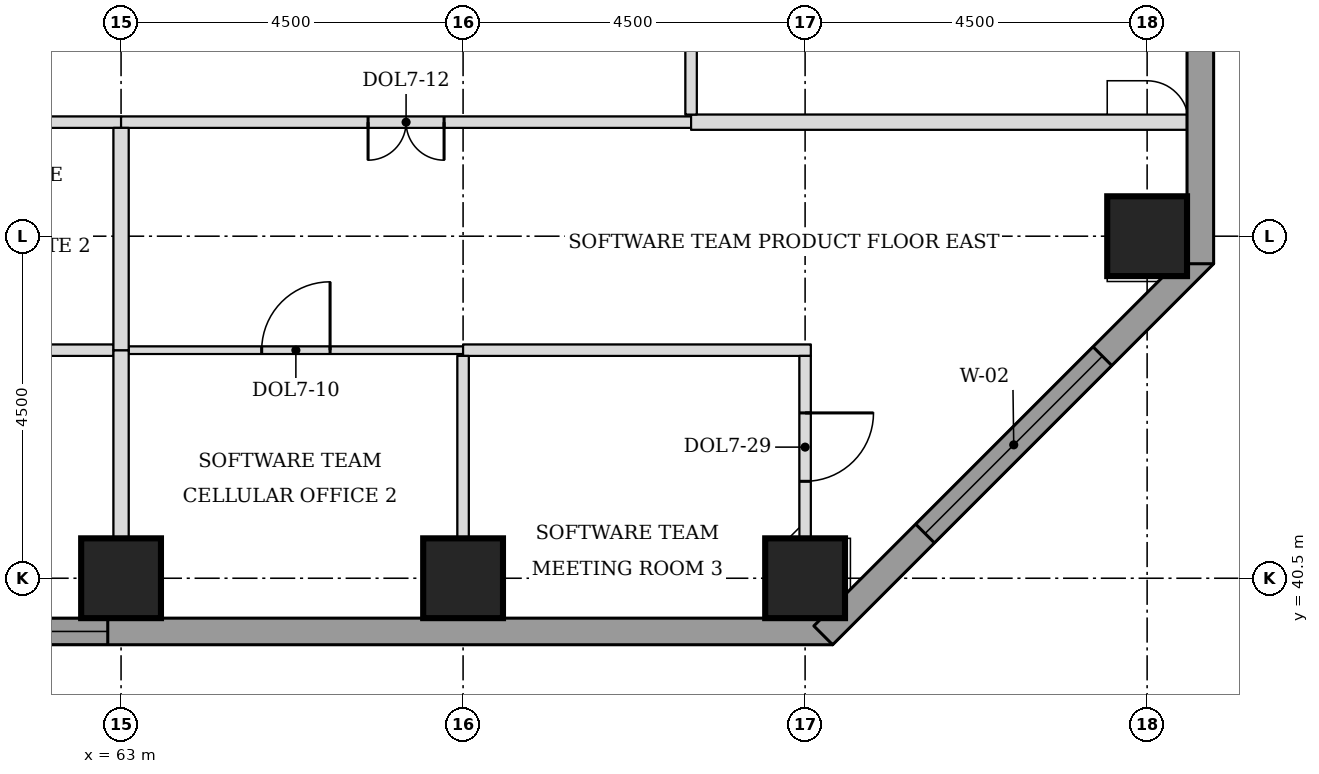
"""IFC4 building model, lengths in metres.
Left out: names, types, materials, properties, quantities, classifications, styles, units other than length and angle.
Written with IfcOpenShell. Run it as: python <this file> out.ifc"""

import sys

from ifc_helpers import new_model, si_unit, direction, frame, frame_2d, origin, origin_2d, place, context, subcontext, project, spatial, rectangle, extrude, element, fill, save


model = new_model("IFC4")
c1 = context("Model", 3, precision=1e-05, world=origin(), true_north=direction((0.0, 1.0)))
c2 = subcontext(c1, "Body", "Model", "MODEL_VIEW")
j1 = project(units=[si_unit("LENGTHUNIT", "METRE"), si_unit("PLANEANGLEUNIT", "RADIAN")], contexts=[c1])
p1 = place(None, origin())
s1 = spatial("IfcSite", under=j1, at=p1, CompositionType="ELEMENT")
p2 = place(p1, origin())
s2 = spatial("IfcBuilding", under=s1, at=p2, CompositionType="ELEMENT")
p3 = place(p2, frame((0.0, 0.0, 134.4)))
s3 = spatial("IfcBuildingStorey", under=s2, at=p3, CompositionType="ELEMENT", Elevation=134.4)
for number, where, z_axis, x_axis in (
    (1, (63.0, 40.5, 0.0), (0.0, 0.0, 1.0), (1.0, 0.0, 0.0)),
    (2, (67.5, 40.5, 0.0), (0.0, 0.0, 1.0), (1.0, 0.0, 0.0)),
    (3, (72.0, 40.5, 0.0), (0.0, 0.0, 1.0), (1.0, 0.0, 0.0)),
    (4, (76.5, 45.0, 0.0), (0.0, 0.0, 1.0), (1.0, 0.0, 0.0)),
):
    element("IfcColumn", number, at=place(p3, frame(where, z_axis=z_axis, x_axis=x_axis)), inside=s3, PredefinedType="COLUMN", context=c2, shape_type="SweptSolid", body=[
        extrude(rectangle(XDim=1.05, YDim=1.05, at=origin_2d()), origin(), (0.0, 0.0, 1.0), 3.7),
    ])
p4 = place(p3, frame((59.025, 39.8, 0.0), z_axis=(0.0, 0.0, 1.0), x_axis=(1.0, 0.0, 0.0)))
e5 = element("IfcWall", 5, at=p4, inside=s3, PredefinedType="STANDARD", context=c2, shape_type="SweptSolid", body=[
    extrude(rectangle(XDim=13.337, YDim=0.35, at=frame_2d((6.669, 0.0))), origin(), (0.0, 0.0, 1.0), 3.525),
])
p5 = place(p4, frame((0.5, 0.0, 0.9)))
e6 = element("IfcOpeningElement", 6, at=p5, cuts=e5, PredefinedType="OPENING", context=c2, shape_type="SweptSolid", body=[
    extrude(rectangle(XDim=3.3, YDim=1.9, at=frame_2d((1.65, 0.95))), frame((0.0, 0.185, 0.0), z_axis=(0.0, -1.0, 0.0), x_axis=(1.0, 0.0, 0.0)), (0.0, 0.0, 1.0), 0.37),
])
p6 = place(p3, frame((72.239, 39.749, 0.0), z_axis=(0.0, 0.0, 1.0), x_axis=(0.707106781187, 0.707106781187, 0.0)))
e7 = element("IfcWall", 7, at=p6, inside=s3, PredefinedType="STANDARD", context=c2, shape_type="SweptSolid", body=[
    extrude(rectangle(XDim=7.089, YDim=0.35, at=frame_2d((3.544, 0.0))), origin(), (0.0, 0.0, 1.0), 3.525),
])
p7 = place(p6, frame((1.894, 0.0, 0.9)))
e8 = element("IfcOpeningElement", 8, at=p7, cuts=e7, PredefinedType="OPENING", context=c2, shape_type="SweptSolid", body=[
    extrude(rectangle(XDim=3.3, YDim=1.9, at=frame_2d((1.65, 0.95))), frame((0.0, 0.185, 0.0), z_axis=(0.0, -1.0, 0.0), x_axis=(1.0, 0.0, 0.0)), (0.0, 0.0, 1.0), 0.37),
])
p8 = place(p3, frame((77.2, 44.638, 0.0), z_axis=(0.0, 0.0, 1.0), x_axis=(0.0, 1.0, 0.0)))
e9 = element("IfcWall", 9, at=p8, inside=s3, PredefinedType="STANDARD", context=c2, shape_type="SweptSolid", body=[
    extrude(rectangle(XDim=32.225, YDim=0.35, at=frame_2d((16.112, 0.0))), origin(), (0.0, 0.0, 1.0), 3.525),
])
p9 = place(p8, frame((5.462, 0.0, 0.9)))
e10 = element("IfcOpeningElement", 10, at=p9, cuts=e9, PredefinedType="OPENING", context=c2, shape_type="SweptSolid", body=[
    extrude(rectangle(XDim=3.3, YDim=1.9, at=frame_2d((1.65, 0.95))), frame((0.0, 0.185, 0.0), z_axis=(0.0, -1.0, 0.0), x_axis=(1.0, 0.0, 0.0)), (0.0, 0.0, 1.0), 0.37),
])
p10 = place(p8, frame((9.962, 0.0, 0.9)))
e11 = element("IfcOpeningElement", 11, at=p10, cuts=e9, PredefinedType="OPENING", context=c2, shape_type="SweptSolid", body=[
    extrude(rectangle(XDim=3.3, YDim=1.9, at=frame_2d((1.65, 0.95))), frame((0.0, 0.185, 0.0), z_axis=(0.0, -1.0, 0.0), x_axis=(1.0, 0.0, 0.0)), (0.0, 0.0, 1.0), 0.37),
])
p11 = place(p8, frame((14.462, 0.0, 0.9)))
e12 = element("IfcOpeningElement", 12, at=p11, cuts=e9, PredefinedType="OPENING", context=c2, shape_type="SweptSolid", body=[
    extrude(rectangle(XDim=3.3, YDim=1.9, at=frame_2d((1.65, 0.95))), frame((0.0, 0.185, 0.0), z_axis=(0.0, -1.0, 0.0), x_axis=(1.0, 0.0, 0.0)), (0.0, 0.0, 1.0), 0.37),
])
p12 = place(p8, frame((18.962, 0.0, 0.9)))
e13 = element("IfcOpeningElement", 13, at=p12, cuts=e9, PredefinedType="OPENING", context=c2, shape_type="SweptSolid", body=[
    extrude(rectangle(XDim=3.3, YDim=1.9, at=frame_2d((1.65, 0.95))), frame((0.0, 0.185, 0.0), z_axis=(0.0, -1.0, 0.0), x_axis=(1.0, 0.0, 0.0)), (0.0, 0.0, 1.0), 0.37),
])
p13 = place(p8, frame((23.462, 0.0, 0.9)))
e14 = element("IfcOpeningElement", 14, at=p13, cuts=e9, PredefinedType="OPENING", context=c2, shape_type="SweptSolid", body=[
    extrude(rectangle(XDim=3.3, YDim=1.9, at=frame_2d((1.65, 0.95))), frame((0.0, 0.185, 0.0), z_axis=(0.0, -1.0, 0.0), x_axis=(1.0, 0.0, 0.0)), (0.0, 0.0, 1.0), 0.37),
])
p14 = place(p3, frame((59.925, 43.5, 0.0), z_axis=(0.0, 0.0, 1.0), x_axis=(1.0, 0.0, 0.0)))
e15 = element("IfcWall", 15, at=p14, inside=s3, PredefinedType="PARTITIONING", context=c2, shape_type="SweptSolid", body=[
    extrude(rectangle(XDim=2.975, YDim=0.15, at=frame_2d((1.487, 0.0))), origin(), (0.0, 0.0, 1.0), 3.55),
])
p15 = place(p14, frame((1.05, 0.0, 0.0)))
e16 = element("IfcOpeningElement", 16, at=p15, cuts=e15, PredefinedType="OPENING", context=c2, shape_type="SweptSolid", body=[
    extrude(rectangle(XDim=0.9, YDim=2.1, at=frame_2d((0.45, 1.05))), frame((0.0, 0.085, 0.0), z_axis=(0.0, -1.0, 0.0), x_axis=(1.0, 0.0, 0.0)), (0.0, 0.0, 1.0), 0.17),
])
p16 = place(p3, frame((63.1, 43.5, 0.0), z_axis=(0.0, 0.0, 1.0), x_axis=(1.0, 0.0, 0.0)))
e17 = element("IfcWall", 17, at=p16, inside=s3, PredefinedType="PARTITIONING", context=c2, shape_type="SweptSolid", body=[
    extrude(rectangle(XDim=4.4, YDim=0.1, at=frame_2d((2.2, 0.0))), origin(), (0.0, 0.0, 1.0), 3.55),
])
p17 = place(p16, frame((1.75, 0.0, 0.0)))
e18 = element("IfcOpeningElement", 18, at=p17, cuts=e17, PredefinedType="OPENING", context=c2, shape_type="SweptSolid", body=[
    extrude(rectangle(XDim=0.9, YDim=2.1, at=frame_2d((0.45, 1.05))), frame((0.0, 0.06, 0.0), z_axis=(0.0, -1.0, 0.0), x_axis=(1.0, 0.0, 0.0)), (0.0, 0.0, 1.0), 0.12),
])
p18 = place(p3, frame((67.5, 43.5, 0.0), z_axis=(0.0, 0.0, 1.0), x_axis=(1.0, 0.0, 0.0)))
e19 = element("IfcWall", 19, at=p18, inside=s3, PredefinedType="PARTITIONING", context=c2, shape_type="SweptSolid", body=[
    extrude(rectangle(XDim=4.575, YDim=0.15, at=frame_2d((2.288, 0.0))), origin(), (0.0, 0.0, 1.0), 3.55),
])
p19 = place(p3, frame((60.0, 46.5, 0.0), z_axis=(0.0, 0.0, 1.0), x_axis=(1.0, 0.0, 0.0)))
e20 = element("IfcWall", 20, at=p19, inside=s3, PredefinedType="PARTITIONING", context=c2, shape_type="SweptSolid", body=[
    extrude(rectangle(XDim=3.0, YDim=0.15, at=frame_2d((1.5, 0.0))), origin(), (0.0, 0.0, 1.0), 3.55),
])
p20 = place(p3, frame((63.0, 46.5, 0.0), z_axis=(0.0, 0.0, 1.0), x_axis=(1.0, 0.0, 0.0)))
e21 = element("IfcWall", 21, at=p20, inside=s3, PredefinedType="PARTITIONING", context=c2, shape_type="SweptSolid", body=[
    extrude(rectangle(XDim=7.5, YDim=0.15, at=frame_2d((3.75, 0.0))), origin(), (0.0, 0.0, 1.0), 3.55),
])
p21 = place(p20, frame((3.25, 0.0, 0.0)))
e22 = element("IfcOpeningElement", 22, at=p21, cuts=e21, PredefinedType="OPENING", context=c2, shape_type="SweptSolid", body=[
    extrude(rectangle(XDim=1.0, YDim=2.1, at=frame_2d((0.5, 1.05))), frame((0.0, 0.085, 0.0), z_axis=(0.0, -1.0, 0.0), x_axis=(1.0, 0.0, 0.0)), (0.0, 0.0, 1.0), 0.17),
])
p22 = place(p3, frame((70.5, 46.5, 0.0), z_axis=(0.0, 0.0, 1.0), x_axis=(1.0, 0.0, 0.0)))
e23 = element("IfcWall", 23, at=p22, inside=s3, PredefinedType="PARTITIONING", context=c2, shape_type="SweptSolid", body=[
    extrude(rectangle(XDim=6.525, YDim=0.2, at=frame_2d((3.262, 0.0))), origin(), (0.0, 0.0, 1.0), 3.55),
])
p23 = place(p3, frame((63.0, 39.975, 0.0), z_axis=(0.0, 0.0, 1.0), x_axis=(0.0, 1.0, 0.0)))
e24 = element("IfcWall", 24, at=p23, inside=s3, PredefinedType="PARTITIONING", context=c2, shape_type="SweptSolid", body=[
    extrude(rectangle(XDim=3.525, YDim=0.2, at=frame_2d((1.762, 0.0))), origin(), (0.0, 0.0, 1.0), 3.55),
])
p24 = place(p3, frame((67.5, 39.975, 0.0), z_axis=(0.0, 0.0, 1.0), x_axis=(0.0, 1.0, 0.0)))
e25 = element("IfcWall", 25, at=p24, inside=s3, PredefinedType="PARTITIONING", context=c2, shape_type="SweptSolid", body=[
    extrude(rectangle(XDim=3.45, YDim=0.15, at=frame_2d((1.725, 0.0))), origin(), (0.0, 0.0, 1.0), 2.938),
])
p25 = place(p3, frame((72.0, 41.025, 0.0), z_axis=(0.0, 0.0, 1.0), x_axis=(0.0, 1.0, 0.0)))
e26 = element("IfcWall", 26, at=p25, inside=s3, PredefinedType="PARTITIONING", context=c2, shape_type="SweptSolid", body=[
    extrude(rectangle(XDim=2.4, YDim=0.15, at=frame_2d((1.2, 0.0))), origin(), (0.0, 0.0, 1.0), 3.55),
])
p26 = place(p25, frame((0.75, 0.0, 0.0)))
e27 = element("IfcOpeningElement", 27, at=p26, cuts=e26, PredefinedType="OPENING", context=c2, shape_type="SweptSolid", body=[
    extrude(rectangle(XDim=0.9, YDim=2.1, at=frame_2d((0.45, 1.05))), frame((0.0, 0.085, 0.0), z_axis=(0.0, -1.0, 0.0), x_axis=(1.0, 0.0, 0.0)), (0.0, 0.0, 1.0), 0.17),
])
p27 = place(p3, frame((63.0, 43.5, 0.0), z_axis=(0.0, 0.0, 1.0), x_axis=(0.0, 1.0, 0.0)))
e28 = element("IfcWall", 28, at=p27, inside=s3, PredefinedType="PARTITIONING", context=c2, shape_type="SweptSolid", body=[
    extrude(rectangle(XDim=2.925, YDim=0.2, at=frame_2d((1.462, 0.0))), origin(), (0.0, 0.0, 1.0), 3.55),
])
p28 = place(p3, frame((70.5, 46.6, 0.0), z_axis=(0.0, 0.0, 1.0), x_axis=(0.0, 1.0, 0.0)))
e29 = element("IfcWall", 29, at=p28, inside=s3, PredefinedType="PARTITIONING", context=c2, shape_type="SweptSolid", body=[
    extrude(rectangle(XDim=13.4, YDim=0.15, at=frame_2d((6.7, 0.0))), origin(), (0.0, 0.0, 1.0), 3.55),
])
p29 = place(p28, frame((6.2, 0.0, 0.0)))
e30 = element("IfcOpeningElement", 30, at=p29, cuts=e29, PredefinedType="OPENING", context=c2, shape_type="SweptSolid", body=[
    extrude(rectangle(XDim=1.0, YDim=2.1, at=frame_2d((0.5, 1.05))), frame((0.0, 0.085, 0.0), z_axis=(0.0, -1.0, 0.0), x_axis=(1.0, 0.0, 0.0)), (0.0, 0.0, 1.0), 0.17),
])
p30 = place(p5, origin())
e31 = element("IfcWindow", 31, at=p30, inside=s3, PartitioningType="SINGLE_PANEL", PredefinedType="WINDOW", context=c2, shape_type="SweptSolid", body=[
    extrude(rectangle(XDim=3.3, YDim=1.9, at=frame_2d((1.65, 0.95))), frame((0.0, 0.085, 0.0), z_axis=(0.0, -1.0, 0.0), x_axis=(1.0, 0.0, 0.0)), (0.0, 0.0, 1.0), 0.06),
])
fill(e6, e31)
p31 = place(p7, origin())
e32 = element("IfcWindow", 32, at=p31, inside=s3, PartitioningType="SINGLE_PANEL", PredefinedType="WINDOW", context=c2, shape_type="SweptSolid", body=[
    extrude(rectangle(XDim=3.3, YDim=1.9, at=frame_2d((1.65, 0.95))), frame((0.0, 0.085, 0.0), z_axis=(0.0, -1.0, 0.0), x_axis=(1.0, 0.0, 0.0)), (0.0, 0.0, 1.0), 0.06),
])
fill(e8, e32)
p32 = place(p21, frame((1.0, 0.0, 0.0), z_axis=(0.0, 0.0, 1.0), x_axis=(-1.0, 0.0, 0.0)))
e33 = element("IfcDoor", 33, at=p32, inside=s3, OperationType="DOUBLE_DOOR_SINGLE_SWING", PredefinedType="DOOR", context=c2, shape_type="SweptSolid", body=[
    extrude(rectangle(XDim=1.0, YDim=2.1, at=frame_2d((0.5, 1.05))), frame((0.0, 0.025, 0.0), z_axis=(0.0, -1.0, 0.0), x_axis=(1.0, 0.0, 0.0)), (0.0, 0.0, 1.0), 0.05),
])
fill(e22, e33)
p33 = place(p17, origin())
e34 = element("IfcDoor", 34, at=p33, inside=s3, OperationType="SINGLE_SWING_RIGHT", PredefinedType="DOOR", context=c2, shape_type="SweptSolid", body=[
    extrude(rectangle(XDim=0.9, YDim=2.1, at=frame_2d((0.45, 1.05))), frame((0.0, 0.025, 0.0), z_axis=(0.0, -1.0, 0.0), x_axis=(1.0, 0.0, 0.0)), (0.0, 0.0, 1.0), 0.05),
])
fill(e18, e34)
p34 = place(p26, frame((0.9, 0.0, 0.0), z_axis=(0.0, 0.0, 1.0), x_axis=(-1.0, 0.0, 0.0)))
e35 = element("IfcDoor", 35, at=p34, inside=s3, OperationType="SINGLE_SWING_LEFT", PredefinedType="DOOR", context=c2, shape_type="SweptSolid", body=[
    extrude(rectangle(XDim=0.9, YDim=2.1, at=frame_2d((0.45, 1.05))), frame((0.0, 0.025, 0.0), z_axis=(0.0, -1.0, 0.0), x_axis=(1.0, 0.0, 0.0)), (0.0, 0.0, 1.0), 0.05),
])
fill(e27, e35)
save(model, sys.argv[1])
